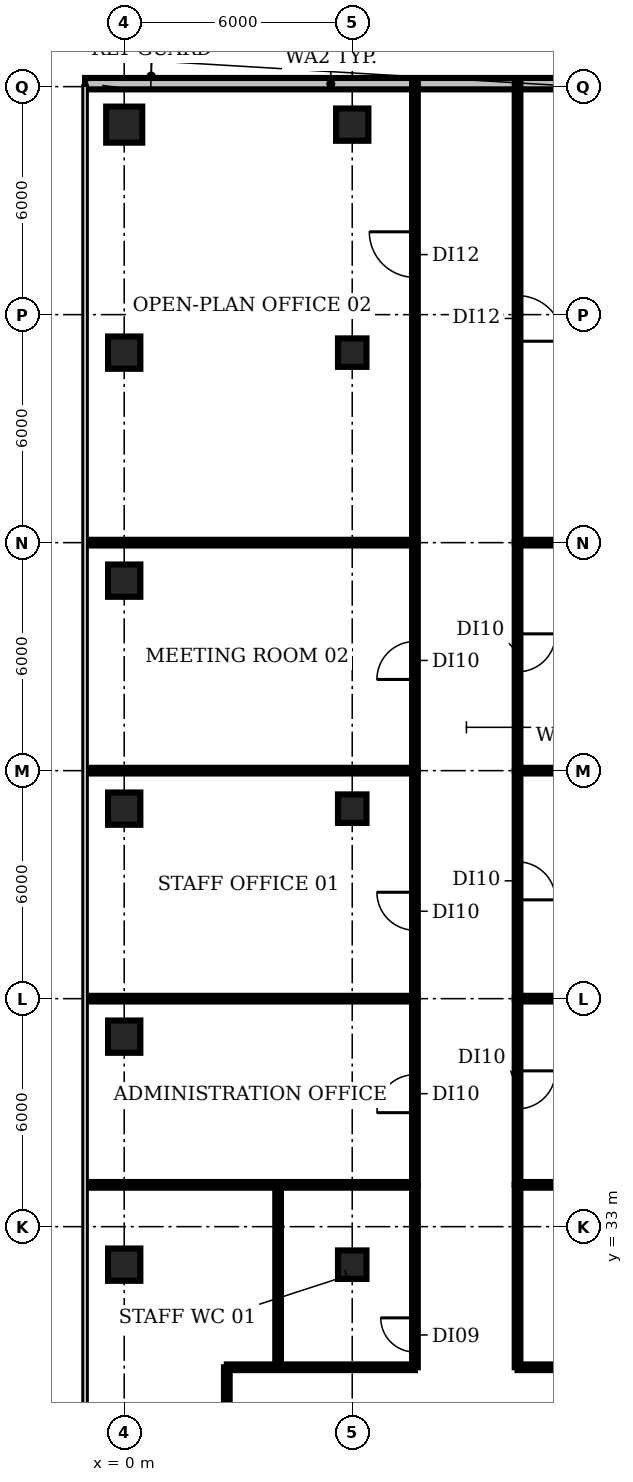
"""IFC4 building model, lengths in metres.
Left out: names, types, materials, properties, quantities, classifications, styles, units other than length and angle.
Written with IfcOpenShell. Run it as: python <this file> out.ifc"""

import sys

from ifc_helpers import new_model, si_unit, direction, frame, frame_2d, origin, origin_2d, place, context, subcontext, project, spatial, rectangle, circle, extrude, element, fill, save


model = new_model("IFC4")
c1 = context("Model", 3, precision=1e-05, world=origin(), true_north=direction((0.0, 1.0)))
c2 = subcontext(c1, "Body", "Model", "MODEL_VIEW")
j1 = project(units=[si_unit("LENGTHUNIT", "METRE"), si_unit("PLANEANGLEUNIT", "RADIAN")], contexts=[c1])
p1 = place(None, origin())
s1 = spatial("IfcSite", under=j1, at=p1, CompositionType="ELEMENT")
p2 = place(p1, origin())
s2 = spatial("IfcBuilding", under=s1, at=p2, CompositionType="ELEMENT")
p3 = place(p2, frame((0.0, 0.0, 159.2)))
s3 = spatial("IfcBuildingStorey", under=s2, at=p3, CompositionType="ELEMENT", Elevation=159.2)
for number, where, z_axis, x_axis in (
    (1, (0.0, 32.0, 0.0), (0.0, 0.0, 1.0), (1.0, 0.0, 0.0)),
    (2, (0.0, 38.0, 0.0), (0.0, 0.0, 1.0), (1.0, 0.0, 0.0)),
    (3, (0.0, 44.0, 0.0), (0.0, 0.0, 1.0), (1.0, 0.0, 0.0)),
    (4, (0.0, 50.0, 0.0), (0.0, 0.0, 1.0), (1.0, 0.0, 0.0)),
    (5, (0.0, 56.0, 0.0), (0.0, 0.0, 1.0), (1.0, 0.0, 0.0)),
):
    element("IfcColumn", number, at=place(p3, frame(where, z_axis=z_axis, x_axis=x_axis)), inside=s3, PredefinedType="COLUMN", context=c2, shape_type="SweptSolid", body=[
        extrude(rectangle(XDim=0.85, YDim=0.85, at=origin_2d()), origin(), (0.0, 0.0, 1.0), 3.85),
    ])
p4 = place(p3, frame((0.0, 62.0, 0.0), z_axis=(0.0, 0.0, 1.0), x_axis=(1.0, 0.0, 0.0)))
e6 = element("IfcColumn", 6, at=p4, inside=s3, PredefinedType="COLUMN", context=c2, shape_type="SweptSolid", body=[
    extrude(circle(Radius=0.475, at=origin_2d()), origin(), (0.0, 0.0, 1.0), 3.85),
])
for number, where, z_axis, x_axis in (
    (7, (6.0, 32.0, 0.0), (0.0, 0.0, 1.0), (1.0, 0.0, 0.0)),
    (8, (6.0, 44.0, 0.0), (0.0, 0.0, 1.0), (1.0, 0.0, 0.0)),
    (9, (6.0, 56.0, 0.0), (0.0, 0.0, 1.0), (1.0, 0.0, 0.0)),
):
    element("IfcColumn", number, at=place(p3, frame(where, z_axis=z_axis, x_axis=x_axis)), inside=s3, PredefinedType="COLUMN", context=c2, shape_type="SweptSolid", body=[
        extrude(rectangle(XDim=0.75, YDim=0.75, at=origin_2d()), origin(), (0.0, 0.0, 1.0), 3.85),
    ])
p5 = place(p3, frame((6.0, 62.0, 0.0), z_axis=(0.0, 0.0, 1.0), x_axis=(1.0, 0.0, 0.0)))
e10 = element("IfcColumn", 10, at=p5, inside=s3, PredefinedType="COLUMN", context=c2, shape_type="SweptSolid", body=[
    extrude(rectangle(XDim=0.85, YDim=0.85, at=origin_2d()), origin(), (0.0, 0.0, 1.0), 3.85),
])
p6 = place(p3, frame((11.902, 63.078, 0.0), z_axis=(0.0, 0.0, 1.0), x_axis=(-1.0, 0.0, 0.0)))
e11 = element("IfcWall", 11, at=p6, inside=s3, PredefinedType="SOLIDWALL", context=c2, shape_type="SweptSolid", body=[
    extrude(rectangle(XDim=12.932, YDim=0.3, at=frame_2d((6.466, 0.0))), origin(), (0.0, 0.0, 1.0), 3.85),
])
p7 = place(p3, frame((-0.98, 34.1, 0.0), z_axis=(0.0, 0.0, 1.0), x_axis=(1.0, 0.0, 0.0)))
e12 = element("IfcWall", 12, at=p7, inside=s3, PredefinedType="PARTITIONING", context=c2, shape_type="SweptSolid", body=[
    extrude(rectangle(XDim=8.63, YDim=0.15, at=frame_2d((4.315, 0.0))), origin(), (0.0, 0.0, 1.0), 2.88),
])
for number, where, z_axis, x_axis in (
    (13, (-0.965, 39.0, 0.0), (0.0, 0.0, 1.0), (1.0, 0.0, 0.0)),
    (14, (-0.965, 45.0, 0.0), (0.0, 0.0, 1.0), (1.0, 0.0, 0.0)),
    (15, (-0.965, 51.0, 0.0), (0.0, 0.0, 1.0), (1.0, 0.0, 0.0)),
):
    element("IfcWall", number, at=place(p3, frame(where, z_axis=z_axis, x_axis=x_axis)), inside=s3, PredefinedType="PARTITIONING", context=c2, shape_type="SweptSolid", body=[
        extrude(rectangle(XDim=8.615, YDim=0.15, at=frame_2d((4.308, 0.0))), origin(), (0.0, 0.0, 1.0), 2.88),
    ])
p8 = place(p3, frame((2.7, 25.4, 0.0), z_axis=(0.0, 0.0, 1.0), x_axis=(0.0, 1.0, 0.0)))
e16 = element("IfcWall", 16, at=p8, inside=s3, PredefinedType="PARTITIONING", context=c2, shape_type="SweptSolid", body=[
    extrude(rectangle(XDim=3.9, YDim=0.15, at=frame_2d((1.95, 0.0))), origin(), (0.0, 0.0, 1.0), 2.88),
])
p9 = place(p3, frame((2.7, 29.3, 0.0), z_axis=(0.0, 0.0, 1.0), x_axis=(1.0, 0.0, 0.0)))
e17 = element("IfcWall", 17, at=p9, inside=s3, PredefinedType="PARTITIONING", context=c2, shape_type="SweptSolid", body=[
    extrude(rectangle(XDim=4.95, YDim=0.15, at=frame_2d((2.475, 0.0))), origin(), (0.0, 0.0, 1.0), 2.88),
])
p10 = place(p3, frame((4.05, 29.3, 0.0), z_axis=(0.0, 0.0, 1.0), x_axis=(0.0, 1.0, 0.0)))
e18 = element("IfcWall", 18, at=p10, inside=s3, PredefinedType="PARTITIONING", context=c2, shape_type="SweptSolid", body=[
    extrude(rectangle(XDim=4.8, YDim=0.15, at=frame_2d((2.4, 0.0))), origin(), (0.0, 0.0, 1.0), 2.88),
])
p11 = place(p3, frame((7.65, 29.3, 0.0), z_axis=(0.0, 0.0, 1.0), x_axis=(0.0, 1.0, 0.0)))
e19 = element("IfcWall", 19, at=p11, inside=s3, PredefinedType="PARTITIONING", context=c2, shape_type="SweptSolid", body=[
    extrude(rectangle(XDim=4.8, YDim=0.15, at=frame_2d((2.4, 0.0))), origin(), (0.0, 0.0, 1.0), 2.88),
])
p12 = place(p11, frame((0.4, 0.0, 0.0)))
e20 = element("IfcOpeningElement", 20, at=p12, cuts=e19, PredefinedType="OPENING", context=c2, shape_type="SweptSolid", body=[
    extrude(rectangle(XDim=0.9, YDim=2.1, at=frame_2d((0.45, 1.05))), frame((0.0, 0.085, 0.0), z_axis=(0.0, -1.0, 0.0), x_axis=(1.0, 0.0, 0.0)), (0.0, 0.0, 1.0), 0.17),
])
p13 = place(p3, frame((7.65, 34.1, 0.0), z_axis=(0.0, 0.0, 1.0), x_axis=(0.0, 1.0, 0.0)))
e21 = element("IfcWall", 21, at=p13, inside=s3, PredefinedType="PARTITIONING", context=c2, shape_type="SweptSolid", body=[
    extrude(rectangle(XDim=4.9, YDim=0.15, at=frame_2d((2.45, 0.0))), origin(), (0.0, 0.0, 1.0), 2.88),
])
p14 = place(p13, frame((1.9, 0.0, 0.0)))
e22 = element("IfcOpeningElement", 22, at=p14, cuts=e21, PredefinedType="OPENING", context=c2, shape_type="SweptSolid", body=[
    extrude(rectangle(XDim=1.0, YDim=2.1, at=frame_2d((0.5, 1.05))), frame((0.0, 0.085, 0.0), z_axis=(0.0, -1.0, 0.0), x_axis=(1.0, 0.0, 0.0)), (0.0, 0.0, 1.0), 0.17),
])
p15 = place(p3, frame((7.65, 39.0, 0.0), z_axis=(0.0, 0.0, 1.0), x_axis=(0.0, 1.0, 0.0)))
e23 = element("IfcWall", 23, at=p15, inside=s3, PredefinedType="PARTITIONING", context=c2, shape_type="SweptSolid", body=[
    extrude(rectangle(XDim=6.0, YDim=0.15, at=frame_2d((3.0, 0.0))), origin(), (0.0, 0.0, 1.0), 2.88),
])
p16 = place(p15, frame((1.8, 0.0, 0.0)))
e24 = element("IfcOpeningElement", 24, at=p16, cuts=e23, PredefinedType="OPENING", context=c2, shape_type="SweptSolid", body=[
    extrude(rectangle(XDim=1.0, YDim=2.1, at=frame_2d((0.5, 1.05))), frame((0.0, 0.085, 0.0), z_axis=(0.0, -1.0, 0.0), x_axis=(1.0, 0.0, 0.0)), (0.0, 0.0, 1.0), 0.17),
])
p17 = place(p3, frame((7.65, 45.0, 0.0), z_axis=(0.0, 0.0, 1.0), x_axis=(0.0, 1.0, 0.0)))
e25 = element("IfcWall", 25, at=p17, inside=s3, PredefinedType="PARTITIONING", context=c2, shape_type="SweptSolid", body=[
    extrude(rectangle(XDim=6.0, YDim=0.15, at=frame_2d((3.0, 0.0))), origin(), (0.0, 0.0, 1.0), 2.88),
])
p18 = place(p17, frame((2.4, 0.0, 0.0)))
e26 = element("IfcOpeningElement", 26, at=p18, cuts=e25, PredefinedType="OPENING", context=c2, shape_type="SweptSolid", body=[
    extrude(rectangle(XDim=1.0, YDim=2.1, at=frame_2d((0.5, 1.05))), frame((0.0, 0.085, 0.0), z_axis=(0.0, -1.0, 0.0), x_axis=(1.0, 0.0, 0.0)), (0.0, 0.0, 1.0), 0.17),
])
p19 = place(p3, frame((7.65, 51.0, 0.0), z_axis=(0.0, 0.0, 1.0), x_axis=(0.0, 1.0, 0.0)))
e27 = element("IfcWall", 27, at=p19, inside=s3, PredefinedType="PARTITIONING", context=c2, shape_type="SweptSolid", body=[
    extrude(rectangle(XDim=12.09, YDim=0.15, at=frame_2d((6.045, 0.0))), origin(), (0.0, 0.0, 1.0), 2.88),
])
p20 = place(p19, frame((6.98, 0.0, 0.0)))
e28 = element("IfcOpeningElement", 28, at=p20, cuts=e27, PredefinedType="OPENING", context=c2, shape_type="SweptSolid", body=[
    extrude(rectangle(XDim=1.2, YDim=2.1, at=frame_2d((0.6, 1.05))), frame((0.0, 0.085, 0.0), z_axis=(0.0, -1.0, 0.0), x_axis=(1.0, 0.0, 0.0)), (0.0, 0.0, 1.0), 0.17),
])
p21 = place(p3, frame((10.35, 29.3, 0.0), z_axis=(0.0, 0.0, 1.0), x_axis=(0.0, 1.0, 0.0)))
e29 = element("IfcWall", 29, at=p21, inside=s3, PredefinedType="PARTITIONING", context=c2, shape_type="SweptSolid", body=[
    extrude(rectangle(XDim=4.8, YDim=0.15, at=frame_2d((2.4, 0.0))), origin(), (0.0, 0.0, 1.0), 2.88),
])
p22 = place(p3, frame((10.35, 29.3, 0.0), z_axis=(0.0, 0.0, 1.0), x_axis=(1.0, 0.0, 0.0)))
e30 = element("IfcWall", 30, at=p22, inside=s3, PredefinedType="PARTITIONING", context=c2, shape_type="SweptSolid", body=[
    extrude(rectangle(XDim=4.05, YDim=0.15, at=frame_2d((2.025, 0.0))), origin(), (0.0, 0.0, 1.0), 2.88),
])
p23 = place(p3, frame((10.35, 34.1, 0.0), z_axis=(0.0, 0.0, 1.0), x_axis=(1.0, 0.0, 0.0)))
e31 = element("IfcWall", 31, at=p23, inside=s3, PredefinedType="PARTITIONING", context=c2, shape_type="SweptSolid", body=[
    extrude(rectangle(XDim=11.37, YDim=0.15, at=frame_2d((5.685, 0.0))), origin(), (0.0, 0.0, 1.0), 2.88),
])
p24 = place(p3, frame((10.35, 39.0, 0.0), z_axis=(0.0, 0.0, 1.0), x_axis=(0.0, -1.0, 0.0)))
e32 = element("IfcWall", 32, at=p24, inside=s3, PredefinedType="PARTITIONING", context=c2, shape_type="SweptSolid", body=[
    extrude(rectangle(XDim=4.9, YDim=0.15, at=frame_2d((2.45, 0.0))), origin(), (0.0, 0.0, 1.0), 2.88),
])
p25 = place(p24, frame((1.9, 0.0, 0.0)))
e33 = element("IfcOpeningElement", 33, at=p25, cuts=e32, PredefinedType="OPENING", context=c2, shape_type="SweptSolid", body=[
    extrude(rectangle(XDim=1.0, YDim=2.1, at=frame_2d((0.5, 1.05))), frame((0.0, 0.085, 0.0), z_axis=(0.0, -1.0, 0.0), x_axis=(1.0, 0.0, 0.0)), (0.0, 0.0, 1.0), 0.17),
])
p26 = place(p3, frame((10.35, 39.0, 0.0), z_axis=(0.0, 0.0, 1.0), x_axis=(1.0, 0.0, 0.0)))
e34 = element("IfcWall", 34, at=p26, inside=s3, PredefinedType="PARTITIONING", context=c2, shape_type="SweptSolid", body=[
    extrude(rectangle(XDim=15.18, YDim=0.15, at=frame_2d((7.59, 0.0))), origin(), (0.0, 0.0, 1.0), 2.88),
])
p27 = place(p3, frame((10.35, 45.0, 0.0), z_axis=(0.0, 0.0, 1.0), x_axis=(0.0, -1.0, 0.0)))
e35 = element("IfcWall", 35, at=p27, inside=s3, PredefinedType="PARTITIONING", context=c2, shape_type="SweptSolid", body=[
    extrude(rectangle(XDim=6.0, YDim=0.15, at=frame_2d((3.0, 0.0))), origin(), (0.0, 0.0, 1.0), 2.88),
])
p28 = place(p27, frame((2.4, 0.0, 0.0)))
e36 = element("IfcOpeningElement", 36, at=p28, cuts=e35, PredefinedType="OPENING", context=c2, shape_type="SweptSolid", body=[
    extrude(rectangle(XDim=1.0, YDim=2.1, at=frame_2d((0.5, 1.05))), frame((0.0, 0.085, 0.0), z_axis=(0.0, -1.0, 0.0), x_axis=(1.0, 0.0, 0.0)), (0.0, 0.0, 1.0), 0.17),
])
p29 = place(p3, frame((10.35, 45.0, 0.0), z_axis=(0.0, 0.0, 1.0), x_axis=(1.0, 0.0, 0.0)))
e37 = element("IfcWall", 37, at=p29, inside=s3, PredefinedType="PARTITIONING", context=c2, shape_type="SweptSolid", body=[
    extrude(rectangle(XDim=15.45, YDim=0.15, at=frame_2d((7.725, 0.0))), origin(), (0.0, 0.0, 1.0), 2.88),
])
p30 = place(p3, frame((10.35, 51.0, 0.0), z_axis=(0.0, 0.0, 1.0), x_axis=(0.0, -1.0, 0.0)))
e38 = element("IfcWall", 38, at=p30, inside=s3, PredefinedType="PARTITIONING", context=c2, shape_type="SweptSolid", body=[
    extrude(rectangle(XDim=6.0, YDim=0.15, at=frame_2d((3.0, 0.0))), origin(), (0.0, 0.0, 1.0), 2.88),
])
p31 = place(p30, frame((2.4, 0.0, 0.0)))
e39 = element("IfcOpeningElement", 39, at=p31, cuts=e38, PredefinedType="OPENING", context=c2, shape_type="SweptSolid", body=[
    extrude(rectangle(XDim=1.0, YDim=2.1, at=frame_2d((0.5, 1.05))), frame((0.0, 0.085, 0.0), z_axis=(0.0, -1.0, 0.0), x_axis=(1.0, 0.0, 0.0)), (0.0, 0.0, 1.0), 0.17),
])
p32 = place(p3, frame((10.35, 51.0, 0.0), z_axis=(0.0, 0.0, 1.0), x_axis=(1.0, 0.0, 0.0)))
e40 = element("IfcWall", 40, at=p32, inside=s3, PredefinedType="PARTITIONING", context=c2, shape_type="SweptSolid", body=[
    extrude(rectangle(XDim=15.71, YDim=0.15, at=frame_2d((7.855, 0.0))), origin(), (0.0, 0.0, 1.0), 2.88),
])
p33 = place(p3, frame((10.35, 63.09, 0.0), z_axis=(0.0, 0.0, 1.0), x_axis=(0.0, -1.0, 0.0)))
e41 = element("IfcWall", 41, at=p33, inside=s3, PredefinedType="PARTITIONING", context=c2, shape_type="SweptSolid", body=[
    extrude(rectangle(XDim=12.09, YDim=0.15, at=frame_2d((6.045, 0.0))), origin(), (0.0, 0.0, 1.0), 2.88),
])
p34 = place(p33, frame((5.59, 0.0, 0.0)))
e42 = element("IfcOpeningElement", 42, at=p34, cuts=e41, PredefinedType="OPENING", context=c2, shape_type="SweptSolid", body=[
    extrude(rectangle(XDim=1.2, YDim=2.1, at=frame_2d((0.6, 1.05))), frame((0.0, 0.085, 0.0), z_axis=(0.0, -1.0, 0.0), x_axis=(1.0, 0.0, 0.0)), (0.0, 0.0, 1.0), 0.17),
])
p35 = place(p12, origin())
e43 = element("IfcDoor", 43, at=p35, inside=s3, OperationType="SINGLE_SWING_RIGHT", PredefinedType="DOOR", context=c2, shape_type="SweptSolid", body=[
    extrude(rectangle(XDim=0.9, YDim=2.1, at=frame_2d((0.45, 1.05))), frame((0.0, 0.025, 0.0), z_axis=(0.0, -1.0, 0.0), x_axis=(1.0, 0.0, 0.0)), (0.0, 0.0, 1.0), 0.05),
])
fill(e20, e43)
p36 = place(p14, origin())
e44 = element("IfcDoor", 44, at=p36, inside=s3, OperationType="SINGLE_SWING_LEFT", PredefinedType="DOOR", context=c2, shape_type="SweptSolid", body=[
    extrude(rectangle(XDim=1.0, YDim=2.1, at=frame_2d((0.5, 1.05))), frame((0.0, 0.025, 0.0), z_axis=(0.0, -1.0, 0.0), x_axis=(1.0, 0.0, 0.0)), (0.0, 0.0, 1.0), 0.05),
])
fill(e22, e44)
p37 = place(p16, origin())
e45 = element("IfcDoor", 45, at=p37, inside=s3, OperationType="SINGLE_SWING_RIGHT", PredefinedType="DOOR", context=c2, shape_type="SweptSolid", body=[
    extrude(rectangle(XDim=1.0, YDim=2.1, at=frame_2d((0.5, 1.05))), frame((0.0, 0.025, 0.0), z_axis=(0.0, -1.0, 0.0), x_axis=(1.0, 0.0, 0.0)), (0.0, 0.0, 1.0), 0.05),
])
fill(e24, e45)
p38 = place(p18, origin())
e46 = element("IfcDoor", 46, at=p38, inside=s3, OperationType="SINGLE_SWING_LEFT", PredefinedType="DOOR", context=c2, shape_type="SweptSolid", body=[
    extrude(rectangle(XDim=1.0, YDim=2.1, at=frame_2d((0.5, 1.05))), frame((0.0, 0.025, 0.0), z_axis=(0.0, -1.0, 0.0), x_axis=(1.0, 0.0, 0.0)), (0.0, 0.0, 1.0), 0.05),
])
fill(e26, e46)
p39 = place(p20, origin())
e47 = element("IfcDoor", 47, at=p39, inside=s3, OperationType="SINGLE_SWING_RIGHT", PredefinedType="DOOR", context=c2, shape_type="SweptSolid", body=[
    extrude(rectangle(XDim=1.2, YDim=2.1, at=frame_2d((0.6, 1.05))), frame((0.0, 0.025, 0.0), z_axis=(0.0, -1.0, 0.0), x_axis=(1.0, 0.0, 0.0)), (0.0, 0.0, 1.0), 0.05),
])
fill(e28, e47)
p40 = place(p25, origin())
e48 = element("IfcDoor", 48, at=p40, inside=s3, OperationType="SINGLE_SWING_LEFT", PredefinedType="DOOR", context=c2, shape_type="SweptSolid", body=[
    extrude(rectangle(XDim=1.0, YDim=2.1, at=frame_2d((0.5, 1.05))), frame((0.0, 0.025, 0.0), z_axis=(0.0, -1.0, 0.0), x_axis=(1.0, 0.0, 0.0)), (0.0, 0.0, 1.0), 0.05),
])
fill(e33, e48)
p41 = place(p28, origin())
e49 = element("IfcDoor", 49, at=p41, inside=s3, OperationType="SINGLE_SWING_RIGHT", PredefinedType="DOOR", context=c2, shape_type="SweptSolid", body=[
    extrude(rectangle(XDim=1.0, YDim=2.1, at=frame_2d((0.5, 1.05))), frame((0.0, 0.025, 0.0), z_axis=(0.0, -1.0, 0.0), x_axis=(1.0, 0.0, 0.0)), (0.0, 0.0, 1.0), 0.05),
])
fill(e36, e49)
p42 = place(p31, origin())
e50 = element("IfcDoor", 50, at=p42, inside=s3, OperationType="SINGLE_SWING_LEFT", PredefinedType="DOOR", context=c2, shape_type="SweptSolid", body=[
    extrude(rectangle(XDim=1.0, YDim=2.1, at=frame_2d((0.5, 1.05))), frame((0.0, 0.025, 0.0), z_axis=(0.0, -1.0, 0.0), x_axis=(1.0, 0.0, 0.0)), (0.0, 0.0, 1.0), 0.05),
])
fill(e39, e50)
p43 = place(p34, origin())
e51 = element("IfcDoor", 51, at=p43, inside=s3, OperationType="SINGLE_SWING_RIGHT", PredefinedType="DOOR", context=c2, shape_type="SweptSolid", body=[
    extrude(rectangle(XDim=1.2, YDim=2.1, at=frame_2d((0.6, 1.05))), frame((0.0, 0.025, 0.0), z_axis=(0.0, -1.0, 0.0), x_axis=(1.0, 0.0, 0.0)), (0.0, 0.0, 1.0), 0.05),
])
fill(e42, e51)
save(model, sys.argv[1])
